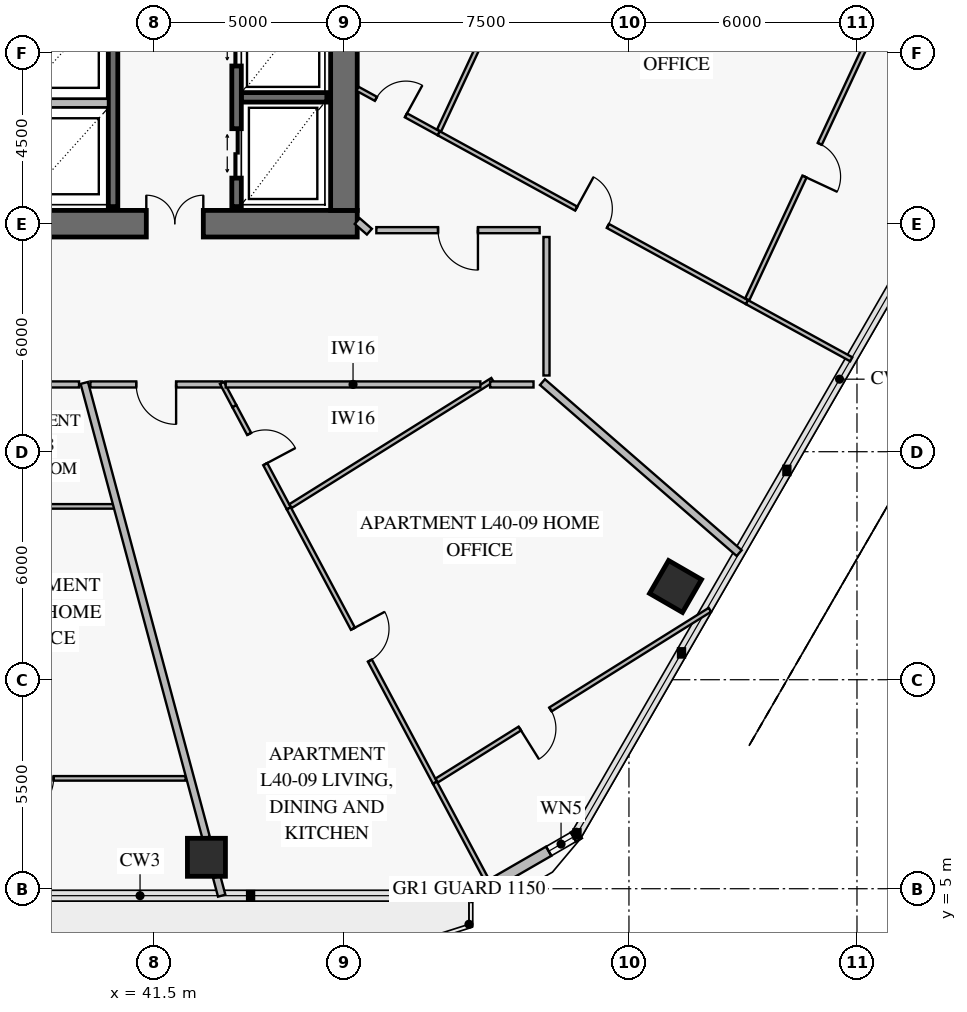
"""IFC4 building model, lengths in metres.
Left out: names, types, materials, properties, quantities, classifications, styles, units other than length and angle.
Written with IfcOpenShell. Run it as: python <this file> out.ifc"""

import sys

from ifc_helpers import new_model, si_unit, direction, frame, frame_2d, origin, origin_2d, place, context, subcontext, project, spatial, rectangle, extrude, element, fill, save


model = new_model("IFC4")
c1 = context("Model", 3, precision=1e-05, world=origin(), true_north=direction((0.0, 1.0)))
c2 = subcontext(c1, "Body", "Model", "MODEL_VIEW")
j1 = project(units=[si_unit("LENGTHUNIT", "METRE"), si_unit("PLANEANGLEUNIT", "RADIAN")], contexts=[c1])
p1 = place(None, origin())
s1 = spatial("IfcSite", under=j1, at=p1, CompositionType="ELEMENT")
p2 = place(p1, origin())
s2 = spatial("IfcBuilding", under=s1, at=p2, CompositionType="ELEMENT")
p3 = place(p2, frame((0.0, 0.0, 161.8)))
s3 = spatial("IfcBuildingStorey", under=s2, at=p3, CompositionType="ELEMENT", Elevation=161.8)
p4 = place(p3, frame((37.35, 22.5, 0.0), z_axis=(0.0, 0.0, 1.0), x_axis=(1.0, 0.0, 0.0)))
e1 = element("IfcWall", 1, at=p4, inside=s3, PredefinedType="SHEAR", context=c2, shape_type="SweptSolid", body=[
    extrude(rectangle(XDim=9.5, YDim=0.7, at=frame_2d((4.75, 0.0))), origin(), (0.0, 0.0, 1.0), 3.8),
])
p5 = place(p4, frame((3.95, 0.0, 0.0)))
e2 = element("IfcOpeningElement", 2, at=p5, cuts=e1, PredefinedType="OPENING", context=c2, shape_type="SweptSolid", body=[
    extrude(rectangle(XDim=1.5, YDim=2.15, at=frame_2d((0.75, 1.075))), frame((0.0, 0.362, 0.0), z_axis=(0.0, -1.0, 0.0), x_axis=(1.0, 0.0, 0.0)), (0.0, 0.0, 1.0), 0.724),
])
p6 = place(p3, frame((46.5, 22.85, 0.0), z_axis=(0.0, 0.0, 1.0), x_axis=(0.0, 1.0, 0.0)))
e3 = element("IfcWall", 3, at=p6, inside=s3, PredefinedType="SHEAR", context=c2, shape_type="SweptSolid", body=[
    extrude(rectangle(XDim=18.3, YDim=0.7, at=frame_2d((9.15, 0.0))), origin(), (0.0, 0.0, 1.0), 3.8),
])
p7 = place(p6, frame((8.9, 0.0, 0.0)))
e4 = element("IfcOpeningElement", 4, at=p7, cuts=e3, PredefinedType="OPENING", context=c2, shape_type="SweptSolid", body=[
    extrude(rectangle(XDim=1.1, YDim=2.15, at=frame_2d((0.55, 1.075))), frame((0.0, 0.362, 0.0), z_axis=(0.0, -1.0, 0.0), x_axis=(1.0, 0.0, 0.0)), (0.0, 0.0, 1.0), 0.724),
])
for number, where, z_axis, x_axis in (
    (5, (42.882, 5.827, 0.0), (0.0, 0.0, 1.0), (1.0, 0.0, 0.0)),
    (6, (55.226, 12.953, 0.0), (0.0, 0.0, 1.0), (0.5, 0.866, 0.0)),
):
    element("IfcColumn", number, at=place(p3, frame(where, z_axis=z_axis, x_axis=x_axis)), inside=s3, PredefinedType="COLUMN", context=c2, shape_type="SweptSolid", body=[
        extrude(rectangle(XDim=1.0, YDim=1.0, at=origin_2d()), origin(), (0.0, 0.0, 1.0), 3.55),
    ])
p8 = place(p3, frame((52.693, 6.452, 0.0), z_axis=(0.0, 0.0, 1.0), x_axis=(-0.866020068361, -0.500009241111, 0.0)))
e7 = element("IfcWall", 7, at=p8, inside=s3, PredefinedType="SOLIDWALL", context=c2, shape_type="SweptSolid", body=[
    extrude(rectangle(XDim=3.365, YDim=0.28, at=frame_2d((1.683, 0.0))), origin(), (0.0, 0.0, 1.0), 3.55),
])
p9 = place(p8, frame((0.179, 0.0, 0.85)))
e8 = element("IfcOpeningElement", 8, at=p9, cuts=e7, PredefinedType="OPENING", context=c2, shape_type="SweptSolid", body=[
    extrude(rectangle(XDim=0.75, YDim=1.5, at=frame_2d((0.375, 0.75))), frame((0.0, 0.152, 0.0), z_axis=(0.0, -1.0, 0.0), x_axis=(1.0, 0.0, 0.0)), (0.0, 0.0, 1.0), 0.304),
])
p10 = place(p3, frame((40.425, 22.95, 0.0), z_axis=(0.0, 0.0, 1.0), x_axis=(0.0, 1.0, 0.0)))
e9 = element("IfcWall", 9, at=p10, inside=s3, PredefinedType="SOLIDWALL", context=c2, shape_type="SweptSolid", body=[
    extrude(rectangle(XDim=8.2, YDim=0.25, at=frame_2d((4.1, 0.0))), origin(), (0.0, 0.0, 1.0), 3.8),
])
p11 = place(p3, frame((43.8, 25.825, 0.0), z_axis=(0.0, 0.0, 1.0), x_axis=(1.0, 0.0, 0.0)))
e10 = element("IfcWall", 10, at=p11, inside=s3, PredefinedType="SOLIDWALL", context=c2, shape_type="SweptSolid", body=[
    extrude(rectangle(XDim=2.25, YDim=0.25, at=frame_2d((1.125, 0.0))), origin(), (0.0, 0.0, 1.0), 3.8),
])
p12 = place(p3, frame((43.675, 22.95, 0.0), z_axis=(0.0, 0.0, 1.0), x_axis=(0.0, 1.0, 0.0)))
e11 = element("IfcWall", 11, at=p12, inside=s3, PredefinedType="SOLIDWALL", context=c2, shape_type="SweptSolid", body=[
    extrude(rectangle(XDim=8.2, YDim=0.25, at=frame_2d((4.1, 0.0))), origin(), (0.0, 0.0, 1.0), 3.8),
])
p13 = place(p12, frame((0.75, 0.0, 0.0)))
e12 = element("IfcOpeningElement", 12, at=p13, cuts=e11, PredefinedType="OPENING", context=c2, shape_type="SweptSolid", body=[
    extrude(rectangle(XDim=1.3, YDim=2.3, at=frame_2d((0.65, 1.15))), frame((0.0, 0.137, 0.0), z_axis=(0.0, -1.0, 0.0), x_axis=(1.0, 0.0, 0.0)), (0.0, 0.0, 1.0), 0.274),
])
p14 = place(p12, frame((3.7, 0.0, 0.0)))
e13 = element("IfcOpeningElement", 13, at=p14, cuts=e11, PredefinedType="OPENING", context=c2, shape_type="SweptSolid", body=[
    extrude(rectangle(XDim=1.3, YDim=2.3, at=frame_2d((0.65, 1.15))), frame((0.0, 0.137, 0.0), z_axis=(0.0, -1.0, 0.0), x_axis=(1.0, 0.0, 0.0)), (0.0, 0.0, 1.0), 0.274),
])
p15 = place(p12, frame((6.62, 0.0, 0.0)))
e14 = element("IfcOpeningElement", 14, at=p15, cuts=e11, PredefinedType="OPENING", context=c2, shape_type="SweptSolid", body=[
    extrude(rectangle(XDim=0.9, YDim=2.1, at=frame_2d((0.45, 1.05))), frame((0.0, 0.137, 0.0), z_axis=(0.0, -1.0, 0.0), x_axis=(1.0, 0.0, 0.0)), (0.0, 0.0, 1.0), 0.274),
])
p16 = place(p3, frame((34.603, 7.904, 0.0), z_axis=(0.0, 0.0, 1.0), x_axis=(1.0, 0.0, 0.0)))
e15 = element("IfcWall", 15, at=p16, inside=s3, PredefinedType="PARTITIONING", context=c2, shape_type="SweptSolid", body=[
    extrude(rectangle(XDim=7.732, YDim=0.12, at=frame_2d((3.866, 0.0))), origin(), (0.0, 0.0, 1.0), 2.9),
])
p17 = place(p16, frame((3.307, 0.0, 0.0)))
e16 = element("IfcOpeningElement", 16, at=p17, cuts=e15, PredefinedType="OPENING", context=c2, shape_type="SweptSolid", body=[
    extrude(rectangle(XDim=0.95, YDim=2.1, at=frame_2d((0.475, 1.05))), frame((0.0, 0.072, 0.0), z_axis=(0.0, -1.0, 0.0), x_axis=(1.0, 0.0, 0.0)), (0.0, 0.0, 1.0), 0.144),
])
p18 = place(p3, frame((43.616, 17.7, 0.0), z_axis=(0.0, 0.0, 1.0), x_axis=(0.470139063633, -0.882592352588, 0.0)))
e17 = element("IfcWall", 17, at=p18, inside=s3, PredefinedType="PARTITIONING", context=c2, shape_type="SweptSolid", body=[
    extrude(rectangle(XDim=3.047, YDim=0.12, at=frame_2d((1.523, 0.0))), origin(), (0.0, 0.0, 1.0), 3.55),
])
p19 = place(p18, frame((0.83, 0.0, 0.0)))
e18 = element("IfcOpeningElement", 18, at=p19, cuts=e17, PredefinedType="OPENING", context=c2, shape_type="SweptSolid", body=[
    extrude(rectangle(XDim=0.9, YDim=2.1, at=frame_2d((0.45, 1.05))), frame((0.0, 0.072, 0.0), z_axis=(0.0, -1.0, 0.0), x_axis=(1.0, 0.0, 0.0)), (0.0, 0.0, 1.0), 0.144),
])
p20 = place(p3, frame((45.049, 15.01, 0.0), z_axis=(0.0, 0.0, 1.0), x_axis=(0.470090976648, -0.882617965869, 0.0)))
e19 = element("IfcWall", 19, at=p20, inside=s3, PredefinedType="PARTITIONING", context=c2, shape_type="SweptSolid", body=[
    extrude(rectangle(XDim=8.181, YDim=0.12, at=frame_2d((4.091, 0.0))), origin(), (0.0, 0.0, 1.0), 2.87),
])
p21 = place(p20, frame((3.591, 0.0, 0.0)))
e20 = element("IfcOpeningElement", 20, at=p21, cuts=e19, PredefinedType="OPENING", context=c2, shape_type="SweptSolid", body=[
    extrude(rectangle(XDim=0.95, YDim=2.1, at=frame_2d((0.475, 1.05))), frame((0.0, 0.072, 0.0), z_axis=(0.0, -1.0, 0.0), x_axis=(1.0, 0.0, 0.0)), (0.0, 0.0, 1.0), 0.144),
])
p22 = place(p3, frame((48.941, 7.848, 0.0), z_axis=(0.0, 0.0, 1.0), x_axis=(0.848033897141, 0.529941986731, 0.0)))
e21 = element("IfcWall", 21, at=p22, inside=s3, PredefinedType="PARTITIONING", context=c2, shape_type="SweptSolid", body=[
    extrude(rectangle(XDim=8.477, YDim=0.12, at=frame_2d((4.239, 0.0))), origin(), (0.0, 0.0, 1.0), 3.55),
])
p23 = place(p22, frame((2.579, 0.0, 0.0)))
e22 = element("IfcOpeningElement", 22, at=p23, cuts=e21, PredefinedType="OPENING", context=c2, shape_type="SweptSolid", body=[
    extrude(rectangle(XDim=0.95, YDim=2.1, at=frame_2d((0.475, 1.05))), frame((0.0, 0.072, 0.0), z_axis=(0.0, -1.0, 0.0), x_axis=(1.0, 0.0, 0.0)), (0.0, 0.0, 1.0), 0.144),
])
p24 = place(p3, frame((39.828, 18.27, 0.0), z_axis=(0.0, 0.0, 1.0), x_axis=(1.0, 0.0, 0.0)))
e23 = element("IfcWall", 23, at=p24, inside=s3, PredefinedType="PARTITIONING", context=c2, shape_type="SweptSolid", body=[
    extrude(rectangle(XDim=3.462, YDim=0.16, at=frame_2d((1.731, 0.0))), origin(), (0.0, 0.0, 1.0), 3.55),
])
p25 = place(p24, frame((1.206, 0.0, 0.0)))
e24 = element("IfcOpeningElement", 24, at=p25, cuts=e23, PredefinedType="OPENING", context=c2, shape_type="SweptSolid", body=[
    extrude(rectangle(XDim=1.05, YDim=2.15, at=frame_2d((0.525, 1.075))), frame((0.0, 0.092, 0.0), z_axis=(0.0, -1.0, 0.0), x_axis=(1.0, 0.0, 0.0)), (0.0, 0.0, 1.0), 0.184),
])
p26 = place(p3, frame((46.858, 26.051, 0.0), z_axis=(0.0, 0.0, 1.0), x_axis=(0.876994813325, -0.480499841209, 0.0)))
e25 = element("IfcWall", 25, at=p26, inside=s3, PredefinedType="PARTITIONING", context=c2, shape_type="SweptSolid", body=[
    extrude(rectangle(XDim=2.438, YDim=0.12, at=frame_2d((1.219, 0.0))), origin(), (0.0, 0.0, 1.0), 3.55),
])
p27 = place(p26, frame((0.552, 0.0, 0.0)))
e26 = element("IfcOpeningElement", 26, at=p27, cuts=e25, PredefinedType="OPENING", context=c2, shape_type="SweptSolid", body=[
    extrude(rectangle(XDim=0.9, YDim=2.1, at=frame_2d((0.45, 1.05))), frame((0.0, 0.072, 0.0), z_axis=(0.0, -1.0, 0.0), x_axis=(1.0, 0.0, 0.0)), (0.0, 0.0, 1.0), 0.144),
])
p28 = place(p3, frame((48.996, 24.879, 0.0), z_axis=(0.0, 0.0, 1.0), x_axis=(0.876975739836, -0.480534651965, 0.0)))
e27 = element("IfcWall", 27, at=p28, inside=s3, PredefinedType="PARTITIONING", context=c2, shape_type="SweptSolid", body=[
    extrude(rectangle(XDim=9.247, YDim=0.12, at=frame_2d((4.623, 0.0))), origin(), (0.0, 0.0, 1.0), 3.15),
])
p29 = place(p28, frame((4.123, 0.0, 0.0)))
e28 = element("IfcOpeningElement", 28, at=p29, cuts=e27, PredefinedType="OPENING", context=c2, shape_type="SweptSolid", body=[
    extrude(rectangle(XDim=0.95, YDim=2.1, at=frame_2d((0.475, 1.05))), frame((0.0, 0.072, 0.0), z_axis=(0.0, -1.0, 0.0), x_axis=(1.0, 0.0, 0.0)), (0.0, 0.0, 1.0), 0.144),
])
p30 = place(p3, frame((57.112, 20.509, 0.0), z_axis=(0.0, 0.0, 1.0), x_axis=(0.422622958653, 0.906305596815, 0.0)))
e29 = element("IfcWall", 29, at=p30, inside=s3, PredefinedType="PARTITIONING", context=c2, shape_type="SweptSolid", body=[
    extrude(rectangle(XDim=8.249, YDim=0.12, at=frame_2d((4.125, 0.0))), origin(), (0.0, 0.0, 1.0), 2.9),
])
p31 = place(p30, frame((3.565, 0.0, 0.0)))
e30 = element("IfcOpeningElement", 30, at=p31, cuts=e29, PredefinedType="OPENING", context=c2, shape_type="SweptSolid", body=[
    extrude(rectangle(XDim=0.95, YDim=2.1, at=frame_2d((0.475, 1.05))), frame((0.0, 0.072, 0.0), z_axis=(0.0, -1.0, 0.0), x_axis=(1.0, 0.0, 0.0)), (0.0, 0.0, 1.0), 0.144),
])
p32 = place(p3, frame((51.65, 22.33, 0.0), z_axis=(0.0, 0.0, 1.0), x_axis=(-1.0, 0.0, 0.0)))
e31 = element("IfcWall", 31, at=p32, inside=s3, PredefinedType="PARTITIONING", context=c2, shape_type="SweptSolid", body=[
    extrude(rectangle(XDim=4.297, YDim=0.16, at=frame_2d((2.148, 0.0))), origin(), (0.0, 0.0, 1.0), 3.55),
])
p33 = place(p32, frame((1.624, 0.0, 0.0)))
e32 = element("IfcOpeningElement", 32, at=p33, cuts=e31, PredefinedType="OPENING", context=c2, shape_type="SweptSolid", body=[
    extrude(rectangle(XDim=1.05, YDim=2.15, at=frame_2d((0.525, 1.075))), frame((0.0, 0.092, 0.0), z_axis=(0.0, -1.0, 0.0), x_axis=(1.0, 0.0, 0.0)), (0.0, 0.0, 1.0), 0.184),
])
p34 = place(p3, frame((38.008, 25.675, 0.0), z_axis=(0.0, 0.0, 1.0), x_axis=(1.0, 0.0, 0.0)))
e33 = element("IfcWall", 33, at=p34, inside=s3, PredefinedType="PARTITIONING", context=c2, shape_type="SweptSolid", body=[
    extrude(rectangle(XDim=2.284, YDim=0.22, at=frame_2d((1.142, 0.0))), origin(), (0.0, 0.0, 1.0), 3.55),
])
p35 = place(p3, frame((35.038, 15.061, 0.0), z_axis=(0.0, 0.0, 1.0), x_axis=(1.0, 0.0, 0.0)))
e34 = element("IfcWall", 34, at=p35, inside=s3, PredefinedType="PARTITIONING", context=c2, shape_type="SweptSolid", body=[
    extrude(rectangle(XDim=5.446, YDim=0.12, at=frame_2d((2.723, 0.0))), origin(), (0.0, 0.0, 1.0), 2.9),
])
p36 = place(p3, frame((39.668, 18.31, 0.0), z_axis=(0.0, 0.0, 1.0), x_axis=(0.258823121138, -0.96592473411, 0.0)))
e35 = element("IfcWall", 35, at=p36, inside=s3, PredefinedType="PARTITIONING", context=c2, shape_type="SweptSolid", body=[
    extrude(rectangle(XDim=12.385, YDim=0.2, at=frame_2d((6.193, 0.0))), origin(), (0.0, 0.0, 1.0), 2.9),
])
p37 = place(p3, frame((43.152, 5.307, 0.0), z_axis=(0.0, 0.0, 1.0), x_axis=(0.258920510492, -0.965898633008, 0.0)))
e36 = element("IfcWall", 36, at=p37, inside=s3, PredefinedType="PARTITIONING", context=c2, shape_type="SweptSolid", body=[
    extrude(rectangle(XDim=0.507, YDim=0.2, at=frame_2d((0.254, 0.0))), origin(), (0.0, 0.0, 1.0), 3.55),
])
p38 = place(p3, frame((43.29, 18.312, 0.0), z_axis=(0.0, 0.0, 1.0), x_axis=(0.470021649014, -0.882654886951, 0.0)))
e37 = element("IfcWall", 37, at=p38, inside=s3, PredefinedType="PARTITIONING", context=c2, shape_type="SweptSolid", body=[
    extrude(rectangle(XDim=0.693, YDim=0.12, at=frame_2d((0.347, 0.0))), origin(), (0.0, 0.0, 1.0), 3.55),
])
p39 = place(p3, frame((48.895, 7.79, 0.0), z_axis=(0.0, 0.0, 1.0), x_axis=(0.47009528372, -0.882615671867, 0.0)))
e38 = element("IfcWall", 38, at=p39, inside=s3, PredefinedType="PARTITIONING", context=c2, shape_type="SweptSolid", body=[
    extrude(rectangle(XDim=3.265, YDim=0.12, at=frame_2d((1.633, 0.0))), origin(), (0.0, 0.0, 1.0), 3.55),
])
p40 = place(p3, frame((45.095, 15.069, 0.0), z_axis=(0.0, 0.0, 1.0), x_axis=(0.84804863288, 0.529918405296, 0.0)))
e39 = element("IfcWall", 39, at=p40, inside=s3, PredefinedType="PARTITIONING", context=c2, shape_type="SweptSolid", body=[
    extrude(rectangle(XDim=6.268, YDim=0.12, at=frame_2d((3.134, 0.0))), origin(), (0.0, 0.0, 1.0), 2.9),
])
p41 = place(p3, frame((46.85, 22.568, 0.0), z_axis=(0.0, 0.0, 1.0), x_axis=(0.754890568134, -0.655850768196, 0.0)))
e40 = element("IfcWall", 40, at=p41, inside=s3, PredefinedType="PARTITIONING", context=c2, shape_type="SweptSolid", body=[
    extrude(rectangle(XDim=0.424, YDim=0.2, at=frame_2d((0.212, 0.0))), origin(), (0.0, 0.0, 1.0), 3.55),
])
p42 = place(p3, frame((51.724, 18.331, 0.0), z_axis=(0.0, 0.0, 1.0), x_axis=(0.754712052901, -0.656056184489, 0.0)))
e41 = element("IfcWall", 41, at=p42, inside=s3, PredefinedType="PARTITIONING", context=c2, shape_type="SweptSolid", body=[
    extrude(rectangle(XDim=6.857, YDim=0.2, at=frame_2d((3.429, 0.0))), origin(), (0.0, 0.0, 1.0), 2.87),
])
p43 = place(p3, frame((57.105, 20.436, 0.0), z_axis=(0.0, 0.0, 1.0), x_axis=(0.876987451506, -0.480513277549, 0.0)))
e42 = element("IfcWall", 42, at=p43, inside=s3, PredefinedType="PARTITIONING", context=c2, shape_type="SweptSolid", body=[
    extrude(rectangle(XDim=3.129, YDim=0.12, at=frame_2d((1.564, 0.0))), origin(), (0.0, 0.0, 1.0), 2.87),
])
p44 = place(p3, frame((49.003, 24.953, 0.0), z_axis=(0.0, 0.0, 1.0), x_axis=(0.422601835676, 0.906315446455, 0.0)))
e43 = element("IfcWall", 43, at=p44, inside=s3, PredefinedType="PARTITIONING", context=c2, shape_type="SweptSolid", body=[
    extrude(rectangle(XDim=5.09, YDim=0.12, at=frame_2d((2.545, 0.0))), origin(), (0.0, 0.0, 1.0), 2.9),
])
p45 = place(p3, frame((35.233, 18.27, 0.0), z_axis=(0.0, 0.0, 1.0), x_axis=(1.0, 0.0, 0.0)))
e44 = element("IfcWall", 44, at=p45, inside=s3, PredefinedType="PARTITIONING", context=c2, shape_type="SweptSolid", body=[
    extrude(rectangle(XDim=4.297, YDim=0.16, at=frame_2d((2.148, 0.0))), origin(), (0.0, 0.0, 1.0), 2.9),
])
p46 = place(p3, frame((43.39, 18.27, 0.0), z_axis=(0.0, 0.0, 1.0), x_axis=(1.0, 0.0, 0.0)))
e45 = element("IfcWall", 45, at=p46, inside=s3, PredefinedType="PARTITIONING", context=c2, shape_type="SweptSolid", body=[
    extrude(rectangle(XDim=6.7, YDim=0.16, at=frame_2d((3.35, 0.0))), origin(), (0.0, 0.0, 1.0), 2.9),
])
p47 = place(p3, frame((50.346, 18.27, 0.0), z_axis=(0.0, 0.0, 1.0), x_axis=(1.0, 0.0, 0.0)))
e46 = element("IfcWall", 46, at=p47, inside=s3, PredefinedType="PARTITIONING", context=c2, shape_type="SweptSolid", body=[
    extrude(rectangle(XDim=1.142, YDim=0.16, at=frame_2d((0.571, 0.0))), origin(), (0.0, 0.0, 1.0), 3.15),
])
p48 = place(p3, frame((51.83, 18.506, 0.0), z_axis=(0.0, 0.0, 1.0), x_axis=(0.0, 1.0, 0.0)))
e47 = element("IfcWall", 47, at=p48, inside=s3, PredefinedType="PARTITIONING", context=c2, shape_type="SweptSolid", body=[
    extrude(rectangle(XDim=3.644, YDim=0.16, at=frame_2d((1.822, 0.0))), origin(), (0.0, 0.0, 1.0), 3.15),
])
p49 = place(p9, origin())
e48 = element("IfcWindow", 48, at=p49, inside=s3, PartitioningType="SINGLE_PANEL", PredefinedType="WINDOW", context=c2, shape_type="SweptSolid", body=[
    extrude(rectangle(XDim=0.75, YDim=1.5, at=frame_2d((0.375, 0.75))), frame((0.0, 0.03, 0.0), z_axis=(0.0, -1.0, 0.0), x_axis=(1.0, 0.0, 0.0)), (0.0, 0.0, 1.0), 0.06),
])
fill(e8, e48)
p50 = place(p5, origin())
e49 = element("IfcDoor", 49, at=p50, inside=s3, OperationType="DOUBLE_DOOR_SINGLE_SWING", PredefinedType="DOOR", context=c2, shape_type="SweptSolid", body=[
    extrude(rectangle(XDim=1.5, YDim=2.15, at=frame_2d((0.75, 1.075))), frame((0.0, 0.025, 0.0), z_axis=(0.0, -1.0, 0.0), x_axis=(1.0, 0.0, 0.0)), (0.0, 0.0, 1.0), 0.05),
])
fill(e2, e49)
p51 = place(p13, origin())
e50 = element("IfcDoor", 50, at=p51, inside=s3, OperationType="DOUBLE_DOOR_SLIDING", PredefinedType="DOOR", context=c2, shape_type="SweptSolid", body=[
    extrude(rectangle(XDim=1.3, YDim=2.3, at=frame_2d((0.65, 1.15))), frame((0.0, 0.025, 0.0), z_axis=(0.0, -1.0, 0.0), x_axis=(1.0, 0.0, 0.0)), (0.0, 0.0, 1.0), 0.05),
])
fill(e12, e50)
p52 = place(p14, origin())
e51 = element("IfcDoor", 51, at=p52, inside=s3, OperationType="DOUBLE_DOOR_SLIDING", PredefinedType="DOOR", context=c2, shape_type="SweptSolid", body=[
    extrude(rectangle(XDim=1.3, YDim=2.3, at=frame_2d((0.65, 1.15))), frame((0.0, 0.025, 0.0), z_axis=(0.0, -1.0, 0.0), x_axis=(1.0, 0.0, 0.0)), (0.0, 0.0, 1.0), 0.05),
])
fill(e13, e51)
p53 = place(p17, frame((0.95, 0.0, 0.0), z_axis=(0.0, 0.0, 1.0), x_axis=(-1.0, 0.0, 0.0)))
e52 = element("IfcDoor", 52, at=p53, inside=s3, OperationType="SINGLE_SWING_RIGHT", PredefinedType="DOOR", context=c2, shape_type="SweptSolid", body=[
    extrude(rectangle(XDim=0.95, YDim=2.1, at=frame_2d((0.475, 1.05))), frame((0.0, 0.025, 0.0), z_axis=(0.0, -1.0, 0.0), x_axis=(1.0, 0.0, 0.0)), (0.0, 0.0, 1.0), 0.05),
])
fill(e16, e52)
p54 = place(p19, origin())
e53 = element("IfcDoor", 53, at=p54, inside=s3, OperationType="SINGLE_SWING_RIGHT", PredefinedType="DOOR", context=c2, shape_type="SweptSolid", body=[
    extrude(rectangle(XDim=0.9, YDim=2.1, at=frame_2d((0.45, 1.05))), frame((0.0, 0.025, 0.0), z_axis=(0.0, -1.0, 0.0), x_axis=(1.0, 0.0, 0.0)), (0.0, 0.0, 1.0), 0.05),
])
fill(e18, e53)
p55 = place(p21, origin())
e54 = element("IfcDoor", 54, at=p55, inside=s3, OperationType="SINGLE_SWING_LEFT", PredefinedType="DOOR", context=c2, shape_type="SweptSolid", body=[
    extrude(rectangle(XDim=0.95, YDim=2.1, at=frame_2d((0.475, 1.05))), frame((0.0, 0.025, 0.0), z_axis=(0.0, -1.0, 0.0), x_axis=(1.0, 0.0, 0.0)), (0.0, 0.0, 1.0), 0.05),
])
fill(e20, e54)
p56 = place(p23, frame((0.95, 0.0, 0.0), z_axis=(0.0, 0.0, 1.0), x_axis=(-1.0, 0.0, 0.0)))
e55 = element("IfcDoor", 55, at=p56, inside=s3, OperationType="SINGLE_SWING_RIGHT", PredefinedType="DOOR", context=c2, shape_type="SweptSolid", body=[
    extrude(rectangle(XDim=0.95, YDim=2.1, at=frame_2d((0.475, 1.05))), frame((0.0, 0.025, 0.0), z_axis=(0.0, -1.0, 0.0), x_axis=(1.0, 0.0, 0.0)), (0.0, 0.0, 1.0), 0.05),
])
fill(e22, e55)
p57 = place(p25, frame((1.05, 0.0, 0.0), z_axis=(0.0, 0.0, 1.0), x_axis=(-1.0, 0.0, 0.0)))
e56 = element("IfcDoor", 56, at=p57, inside=s3, OperationType="SINGLE_SWING_LEFT", PredefinedType="DOOR", context=c2, shape_type="SweptSolid", body=[
    extrude(rectangle(XDim=1.05, YDim=2.15, at=frame_2d((0.525, 1.075))), frame((0.0, 0.025, 0.0), z_axis=(0.0, -1.0, 0.0), x_axis=(1.0, 0.0, 0.0)), (0.0, 0.0, 1.0), 0.05),
])
fill(e24, e56)
p58 = place(p27, origin())
e57 = element("IfcDoor", 57, at=p58, inside=s3, OperationType="SINGLE_SWING_RIGHT", PredefinedType="DOOR", context=c2, shape_type="SweptSolid", body=[
    extrude(rectangle(XDim=0.9, YDim=2.1, at=frame_2d((0.45, 1.05))), frame((0.0, 0.025, 0.0), z_axis=(0.0, -1.0, 0.0), x_axis=(1.0, 0.0, 0.0)), (0.0, 0.0, 1.0), 0.05),
])
fill(e26, e57)
p59 = place(p29, origin())
e58 = element("IfcDoor", 58, at=p59, inside=s3, OperationType="SINGLE_SWING_LEFT", PredefinedType="DOOR", context=c2, shape_type="SweptSolid", body=[
    extrude(rectangle(XDim=0.95, YDim=2.1, at=frame_2d((0.475, 1.05))), frame((0.0, 0.025, 0.0), z_axis=(0.0, -1.0, 0.0), x_axis=(1.0, 0.0, 0.0)), (0.0, 0.0, 1.0), 0.05),
])
fill(e28, e58)
p60 = place(p31, frame((0.95, 0.0, 0.0), z_axis=(0.0, 0.0, 1.0), x_axis=(-1.0, 0.0, 0.0)))
e59 = element("IfcDoor", 59, at=p60, inside=s3, OperationType="SINGLE_SWING_RIGHT", PredefinedType="DOOR", context=c2, shape_type="SweptSolid", body=[
    extrude(rectangle(XDim=0.95, YDim=2.1, at=frame_2d((0.475, 1.05))), frame((0.0, 0.025, 0.0), z_axis=(0.0, -1.0, 0.0), x_axis=(1.0, 0.0, 0.0)), (0.0, 0.0, 1.0), 0.05),
])
fill(e30, e59)
p61 = place(p33, origin())
e60 = element("IfcDoor", 60, at=p61, inside=s3, OperationType="SINGLE_SWING_LEFT", PredefinedType="DOOR", context=c2, shape_type="SweptSolid", body=[
    extrude(rectangle(XDim=1.05, YDim=2.15, at=frame_2d((0.525, 1.075))), frame((0.0, 0.025, 0.0), z_axis=(0.0, -1.0, 0.0), x_axis=(1.0, 0.0, 0.0)), (0.0, 0.0, 1.0), 0.05),
])
fill(e32, e60)
save(model, sys.argv[1])
